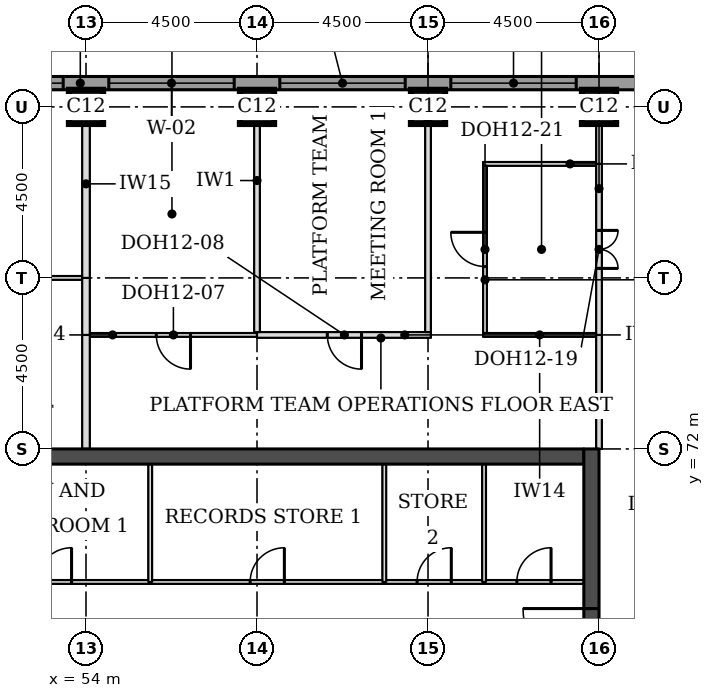
"""IFC4 building model, lengths in metres.
Left out: names, types, materials, properties, quantities, classifications, styles, units other than length and angle.
Written with IfcOpenShell. Run it as: python <this file> out.ifc"""

import sys

from ifc_helpers import new_model, si_unit, direction, frame, frame_2d, origin, origin_2d, place, context, subcontext, project, spatial, rectangle, extrude, element, fill, save


model = new_model("IFC4")
c1 = context("Model", 3, precision=1e-05, world=origin(), true_north=direction((0.0, 1.0)))
c2 = subcontext(c1, "Body", "Model", "MODEL_VIEW")
j1 = project(units=[si_unit("LENGTHUNIT", "METRE"), si_unit("PLANEANGLEUNIT", "RADIAN")], contexts=[c1])
p1 = place(None, origin())
s1 = spatial("IfcSite", under=j1, at=p1, CompositionType="ELEMENT")
p2 = place(p1, origin())
s2 = spatial("IfcBuilding", under=s1, at=p2, CompositionType="ELEMENT")
p3 = place(p2, frame((0.0, 0.0, 245.2)))
s3 = spatial("IfcBuildingStorey", under=s2, at=p3, CompositionType="ELEMENT", Elevation=245.2)
for number, where, z_axis, x_axis in (
    (1, (54.0, 81.0, 0.0), (0.0, 0.0, 1.0), (1.0, 0.0, 0.0)),
    (2, (58.5, 81.0, 0.0), (0.0, 0.0, 1.0), (1.0, 0.0, 0.0)),
    (3, (63.0, 81.0, 0.0), (0.0, 0.0, 1.0), (1.0, 0.0, 0.0)),
    (4, (67.5, 81.0, 0.0), (0.0, 0.0, 1.0), (1.0, 0.0, 0.0)),
):
    element("IfcColumn", number, at=place(p3, frame(where, z_axis=z_axis, x_axis=x_axis)), inside=s3, PredefinedType="COLUMN", context=c2, shape_type="SweptSolid", body=[
        extrude(rectangle(XDim=0.9, YDim=0.9, at=origin_2d()), origin(), (0.0, 0.0, 1.0), 3.7),
    ])
p4 = place(p3, frame((45.4, 71.8, 0.0), z_axis=(0.0, 0.0, 1.0), x_axis=(1.0, 0.0, 0.0)))
e5 = element("IfcWall", 5, at=p4, inside=s3, PredefinedType="SHEAR", context=c2, shape_type="SweptSolid", body=[
    extrude(rectangle(XDim=21.7, YDim=0.4, at=frame_2d((10.85, 0.0))), origin(), (0.0, 0.0, 1.0), 3.7),
])
p5 = place(p3, frame((67.3, 49.5, 0.0), z_axis=(0.0, 0.0, 1.0), x_axis=(0.0, 1.0, 0.0)))
e6 = element("IfcWall", 6, at=p5, inside=s3, PredefinedType="SHEAR", context=c2, shape_type="SweptSolid", body=[
    extrude(rectangle(XDim=22.5, YDim=0.4, at=frame_2d((11.25, 0.0))), origin(), (0.0, 0.0, 1.0), 3.7),
])
p6 = place(p5, frame((4.2, 0.0, 0.0)))
e7 = element("IfcOpeningElement", 7, at=p6, cuts=e6, PredefinedType="OPENING", context=c2, shape_type="SweptSolid", body=[
    extrude(rectangle(XDim=1.8, YDim=2.1, at=frame_2d((0.9, 1.05))), frame((0.0, 0.21, 0.0), z_axis=(0.0, -1.0, 0.0), x_axis=(1.0, 0.0, 0.0)), (0.0, 0.0, 1.0), 0.42),
])
p7 = place(p5, frame((6.9, 0.0, 0.0)))
e8 = element("IfcOpeningElement", 8, at=p7, cuts=e6, PredefinedType="OPENING", context=c2, shape_type="SweptSolid", body=[
    extrude(rectangle(XDim=1.1, YDim=2.1, at=frame_2d((0.55, 1.05))), frame((0.0, 0.21, 0.0), z_axis=(0.0, -1.0, 0.0), x_axis=(1.0, 0.0, 0.0)), (0.0, 0.0, 1.0), 0.42),
])
p8 = place(p5, frame((13.6, 0.0, 0.0)))
e9 = element("IfcOpeningElement", 9, at=p8, cuts=e6, PredefinedType="OPENING", context=c2, shape_type="SweptSolid", body=[
    extrude(rectangle(XDim=1.1, YDim=2.1, at=frame_2d((0.55, 1.05))), frame((0.0, 0.21, 0.0), z_axis=(0.0, -1.0, 0.0), x_axis=(1.0, 0.0, 0.0)), (0.0, 0.0, 1.0), 0.42),
])
p9 = place(p5, frame((16.5, 0.0, 0.0)))
e10 = element("IfcOpeningElement", 10, at=p9, cuts=e6, PredefinedType="OPENING", context=c2, shape_type="SweptSolid", body=[
    extrude(rectangle(XDim=1.8, YDim=2.1, at=frame_2d((0.9, 1.05))), frame((0.0, 0.21, 0.0), z_axis=(0.0, -1.0, 0.0), x_axis=(1.0, 0.0, 0.0)), (0.0, 0.0, 1.0), 0.42),
])
p10 = place(p3, frame((72.331, 81.625, 0.0), z_axis=(0.0, 0.0, 1.0), x_axis=(-1.0, 0.0, 0.0)))
e11 = element("IfcWall", 11, at=p10, inside=s3, PredefinedType="STANDARD", context=c2, shape_type="SweptSolid", body=[
    extrude(rectangle(XDim=32.163, YDim=0.35, at=frame_2d((16.081, 0.0))), origin(), (0.0, 0.0, 1.0), 3.525),
])
p11 = place(p10, frame((5.431, 0.0, 0.9)))
e12 = element("IfcOpeningElement", 12, at=p11, cuts=e11, PredefinedType="OPENING", context=c2, shape_type="SweptSolid", body=[
    extrude(rectangle(XDim=3.3, YDim=1.9, at=frame_2d((1.65, 0.95))), frame((0.0, 0.185, 0.0), z_axis=(0.0, -1.0, 0.0), x_axis=(1.0, 0.0, 0.0)), (0.0, 0.0, 1.0), 0.37),
])
p12 = place(p10, frame((9.931, 0.0, 0.9)))
e13 = element("IfcOpeningElement", 13, at=p12, cuts=e11, PredefinedType="OPENING", context=c2, shape_type="SweptSolid", body=[
    extrude(rectangle(XDim=3.3, YDim=1.9, at=frame_2d((1.65, 0.95))), frame((0.0, 0.185, 0.0), z_axis=(0.0, -1.0, 0.0), x_axis=(1.0, 0.0, 0.0)), (0.0, 0.0, 1.0), 0.37),
])
p13 = place(p10, frame((14.431, 0.0, 0.9)))
e14 = element("IfcOpeningElement", 14, at=p13, cuts=e11, PredefinedType="OPENING", context=c2, shape_type="SweptSolid", body=[
    extrude(rectangle(XDim=3.3, YDim=1.9, at=frame_2d((1.65, 0.95))), frame((0.0, 0.185, 0.0), z_axis=(0.0, -1.0, 0.0), x_axis=(1.0, 0.0, 0.0)), (0.0, 0.0, 1.0), 0.37),
])
p14 = place(p10, frame((18.931, 0.0, 0.9)))
e15 = element("IfcOpeningElement", 15, at=p14, cuts=e11, PredefinedType="OPENING", context=c2, shape_type="SweptSolid", body=[
    extrude(rectangle(XDim=3.3, YDim=1.9, at=frame_2d((1.65, 0.95))), frame((0.0, 0.185, 0.0), z_axis=(0.0, -1.0, 0.0), x_axis=(1.0, 0.0, 0.0)), (0.0, 0.0, 1.0), 0.37),
])
p15 = place(p10, frame((23.431, 0.0, 0.9)))
e16 = element("IfcOpeningElement", 16, at=p15, cuts=e11, PredefinedType="OPENING", context=c2, shape_type="SweptSolid", body=[
    extrude(rectangle(XDim=3.3, YDim=1.9, at=frame_2d((1.65, 0.95))), frame((0.0, 0.185, 0.0), z_axis=(0.0, -1.0, 0.0), x_axis=(1.0, 0.0, 0.0)), (0.0, 0.0, 1.0), 0.37),
])
p16 = place(p3, frame((54.1, 75.0, 0.0), z_axis=(0.0, 0.0, 1.0), x_axis=(1.0, 0.0, 0.0)))
e17 = element("IfcWall", 17, at=p16, inside=s3, PredefinedType="PARTITIONING", context=c2, shape_type="SweptSolid", body=[
    extrude(rectangle(XDim=4.4, YDim=0.1, at=frame_2d((2.2, 0.0))), origin(), (0.0, 0.0, 1.0), 3.55),
])
p17 = place(p16, frame((1.75, 0.0, 0.0)))
e18 = element("IfcOpeningElement", 18, at=p17, cuts=e17, PredefinedType="OPENING", context=c2, shape_type="SweptSolid", body=[
    extrude(rectangle(XDim=0.9, YDim=2.1, at=frame_2d((0.45, 1.05))), frame((0.0, 0.06, 0.0), z_axis=(0.0, -1.0, 0.0), x_axis=(1.0, 0.0, 0.0)), (0.0, 0.0, 1.0), 0.12),
])
p18 = place(p3, frame((58.5, 75.0, 0.0), z_axis=(0.0, 0.0, 1.0), x_axis=(1.0, 0.0, 0.0)))
e19 = element("IfcWall", 19, at=p18, inside=s3, PredefinedType="PARTITIONING", context=c2, shape_type="SweptSolid", body=[
    extrude(rectangle(XDim=4.575, YDim=0.15, at=frame_2d((2.288, 0.0))), origin(), (0.0, 0.0, 1.0), 3.55),
])
p19 = place(p18, frame((1.85, 0.0, 0.0)))
e20 = element("IfcOpeningElement", 20, at=p19, cuts=e19, PredefinedType="OPENING", context=c2, shape_type="SweptSolid", body=[
    extrude(rectangle(XDim=0.9, YDim=2.1, at=frame_2d((0.45, 1.05))), frame((0.0, 0.085, 0.0), z_axis=(0.0, -1.0, 0.0), x_axis=(1.0, 0.0, 0.0)), (0.0, 0.0, 1.0), 0.17),
])
p20 = place(p3, frame((64.45, 75.0, 0.0), z_axis=(0.0, 0.0, 1.0), x_axis=(1.0, 0.0, 0.0)))
e21 = element("IfcWall", 21, at=p20, inside=s3, PredefinedType="PARTITIONING", context=c2, shape_type="SweptSolid", body=[
    extrude(rectangle(XDim=2.975, YDim=0.1, at=frame_2d((1.488, 0.0))), origin(), (0.0, 0.0, 1.0), 3.55),
])
p21 = place(p3, frame((49.45, 76.5, 0.0), z_axis=(0.0, 0.0, 1.0), x_axis=(1.0, 0.0, 0.0)))
e22 = element("IfcWall", 22, at=p21, inside=s3, PredefinedType="PARTITIONING", context=c2, shape_type="SweptSolid", body=[
    extrude(rectangle(XDim=4.45, YDim=0.1, at=frame_2d((2.225, 0.0))), origin(), (0.0, 0.0, 1.0), 3.55),
])
p22 = place(p3, frame((64.45, 79.5, 0.0), z_axis=(0.0, 0.0, 1.0), x_axis=(1.0, 0.0, 0.0)))
e23 = element("IfcWall", 23, at=p22, inside=s3, PredefinedType="PARTITIONING", context=c2, shape_type="SweptSolid", body=[
    extrude(rectangle(XDim=2.975, YDim=0.1, at=frame_2d((1.488, 0.0))), origin(), (0.0, 0.0, 1.0), 3.55),
])
p23 = place(p3, frame((54.0, 72.0, 0.0), z_axis=(0.0, 0.0, 1.0), x_axis=(0.0, 1.0, 0.0)))
e24 = element("IfcWall", 24, at=p23, inside=s3, PredefinedType="PARTITIONING", context=c2, shape_type="SweptSolid", body=[
    extrude(rectangle(XDim=3.0, YDim=0.2, at=frame_2d((1.5, 0.0))), origin(), (0.0, 0.0, 1.0), 3.55),
])
p24 = place(p3, frame((67.5, 72.0, 0.0), z_axis=(0.0, 0.0, 1.0), x_axis=(0.0, 1.0, 0.0)))
e25 = element("IfcWall", 25, at=p24, inside=s3, PredefinedType="PARTITIONING", context=c2, shape_type="SweptSolid", body=[
    extrude(rectangle(XDim=3.0, YDim=0.15, at=frame_2d((1.5, 0.0))), origin(), (0.0, 0.0, 1.0), 3.022),
])
p25 = place(p3, frame((54.0, 75.0, 0.0), z_axis=(0.0, 0.0, 1.0), x_axis=(0.0, 1.0, 0.0)))
e26 = element("IfcWall", 26, at=p25, inside=s3, PredefinedType="PARTITIONING", context=c2, shape_type="SweptSolid", body=[
    extrude(rectangle(XDim=1.5, YDim=0.2, at=frame_2d((0.75, 0.0))), origin(), (0.0, 0.0, 1.0), 3.55),
])
p26 = place(p3, frame((67.5, 75.0, 0.0), z_axis=(0.0, 0.0, 1.0), x_axis=(0.0, 1.0, 0.0)))
e27 = element("IfcWall", 27, at=p26, inside=s3, PredefinedType="PARTITIONING", context=c2, shape_type="SweptSolid", body=[
    extrude(rectangle(XDim=4.5, YDim=0.15, at=frame_2d((2.25, 0.0))), origin(), (0.0, 0.0, 1.0), 3.022),
])
p27 = place(p26, frame((1.75, 0.0, 0.0)))
e28 = element("IfcOpeningElement", 28, at=p27, cuts=e27, PredefinedType="OPENING", context=c2, shape_type="SweptSolid", body=[
    extrude(rectangle(XDim=1.0, YDim=2.1, at=frame_2d((0.5, 1.05))), frame((0.0, 0.085, 0.0), z_axis=(0.0, -1.0, 0.0), x_axis=(1.0, 0.0, 0.0)), (0.0, 0.0, 1.0), 0.17),
])
p28 = place(p3, frame((64.5, 75.05, 0.0), z_axis=(0.0, 0.0, 1.0), x_axis=(0.0, 1.0, 0.0)))
e29 = element("IfcWall", 29, at=p28, inside=s3, PredefinedType="PARTITIONING", context=c2, shape_type="SweptSolid", body=[
    extrude(rectangle(XDim=4.4, YDim=0.1, at=frame_2d((2.2, 0.0))), origin(), (0.0, 0.0, 1.0), 3.55),
])
p29 = place(p28, frame((1.75, 0.0, 0.0)))
e30 = element("IfcOpeningElement", 30, at=p29, cuts=e29, PredefinedType="OPENING", context=c2, shape_type="SweptSolid", body=[
    extrude(rectangle(XDim=0.9, YDim=2.1, at=frame_2d((0.45, 1.05))), frame((0.0, 0.06, 0.0), z_axis=(0.0, -1.0, 0.0), x_axis=(1.0, 0.0, 0.0)), (0.0, 0.0, 1.0), 0.12),
])
for number, where, z_axis, x_axis in (
    (31, (58.5, 75.075, 0.0), (0.0, 0.0, 1.0), (0.0, 1.0, 0.0)),
    (32, (63.0, 75.075, 0.0), (0.0, 0.0, 1.0), (0.0, 1.0, 0.0)),
):
    element("IfcWall", number, at=place(p3, frame(where, z_axis=z_axis, x_axis=x_axis)), inside=s3, PredefinedType="PARTITIONING", context=c2, shape_type="SweptSolid", body=[
        extrude(rectangle(XDim=6.375, YDim=0.15, at=frame_2d((3.188, 0.0))), origin(), (0.0, 0.0, 1.0), 3.55),
    ])
p30 = place(p3, frame((54.0, 76.5, 0.0), z_axis=(0.0, 0.0, 1.0), x_axis=(0.0, 1.0, 0.0)))
e33 = element("IfcWall", 33, at=p30, inside=s3, PredefinedType="PARTITIONING", context=c2, shape_type="SweptSolid", body=[
    extrude(rectangle(XDim=4.95, YDim=0.2, at=frame_2d((2.475, 0.0))), origin(), (0.0, 0.0, 1.0), 3.55),
])
p31 = place(p3, frame((67.5, 79.5, 0.0), z_axis=(0.0, 0.0, 1.0), x_axis=(0.0, 1.0, 0.0)))
e34 = element("IfcWall", 34, at=p31, inside=s3, PredefinedType="PARTITIONING", context=c2, shape_type="SweptSolid", body=[
    extrude(rectangle(XDim=1.95, YDim=0.15, at=frame_2d((0.975, 0.0))), origin(), (0.0, 0.0, 1.0), 3.022),
])
p32 = place(p3, frame((45.4, 68.5, 0.0), z_axis=(0.0, 0.0, 1.0), x_axis=(1.0, 0.0, 0.0)))
e35 = element("IfcWall", 35, at=p32, inside=s3, PredefinedType="PARTITIONING", context=c2, shape_type="SweptSolid", body=[
    extrude(rectangle(XDim=21.7, YDim=0.1, at=frame_2d((10.85, 0.0))), origin(), (0.0, 0.0, 1.0), 3.55),
])
p33 = place(p32, frame((19.938, 0.0, 0.0)))
e36 = element("IfcOpeningElement", 36, at=p33, cuts=e35, PredefinedType="OPENING", context=c2, shape_type="SweptSolid", body=[
    extrude(rectangle(XDim=0.9, YDim=2.1, at=frame_2d((0.45, 1.05))), frame((0.0, 0.06, 0.0), z_axis=(0.0, -1.0, 0.0), x_axis=(1.0, 0.0, 0.0)), (0.0, 0.0, 1.0), 0.12),
])
p34 = place(p32, frame((17.312, 0.0, 0.0)))
e37 = element("IfcOpeningElement", 37, at=p34, cuts=e35, PredefinedType="OPENING", context=c2, shape_type="SweptSolid", body=[
    extrude(rectangle(XDim=0.9, YDim=2.1, at=frame_2d((0.45, 1.05))), frame((0.0, 0.06, 0.0), z_axis=(0.0, -1.0, 0.0), x_axis=(1.0, 0.0, 0.0)), (0.0, 0.0, 1.0), 0.12),
])
p35 = place(p32, frame((0.442, 0.0, 0.0)))
e38 = element("IfcOpeningElement", 38, at=p35, cuts=e35, PredefinedType="OPENING", context=c2, shape_type="SweptSolid", body=[
    extrude(rectangle(XDim=0.9, YDim=2.1, at=frame_2d((0.45, 1.05))), frame((0.0, 0.06, 0.0), z_axis=(0.0, -1.0, 0.0), x_axis=(1.0, 0.0, 0.0)), (0.0, 0.0, 1.0), 0.12),
])
p36 = place(p32, frame((2.201, 0.0, 0.0)))
e39 = element("IfcOpeningElement", 39, at=p36, cuts=e35, PredefinedType="OPENING", context=c2, shape_type="SweptSolid", body=[
    extrude(rectangle(XDim=0.9, YDim=2.1, at=frame_2d((0.45, 1.05))), frame((0.0, 0.06, 0.0), z_axis=(0.0, -1.0, 0.0), x_axis=(1.0, 0.0, 0.0)), (0.0, 0.0, 1.0), 0.12),
])
p37 = place(p32, frame((3.934, 0.0, 0.0)))
e40 = element("IfcOpeningElement", 40, at=p37, cuts=e35, PredefinedType="OPENING", context=c2, shape_type="SweptSolid", body=[
    extrude(rectangle(XDim=0.9, YDim=2.1, at=frame_2d((0.45, 1.05))), frame((0.0, 0.06, 0.0), z_axis=(0.0, -1.0, 0.0), x_axis=(1.0, 0.0, 0.0)), (0.0, 0.0, 1.0), 0.12),
])
p38 = place(p32, frame((12.92, 0.0, 0.0)))
e41 = element("IfcOpeningElement", 41, at=p38, cuts=e35, PredefinedType="OPENING", context=c2, shape_type="SweptSolid", body=[
    extrude(rectangle(XDim=0.9, YDim=2.1, at=frame_2d((0.45, 1.05))), frame((0.0, 0.06, 0.0), z_axis=(0.0, -1.0, 0.0), x_axis=(1.0, 0.0, 0.0)), (0.0, 0.0, 1.0), 0.12),
])
p39 = place(p32, frame((7.32, 0.0, 0.0)))
e42 = element("IfcOpeningElement", 42, at=p39, cuts=e35, PredefinedType="OPENING", context=c2, shape_type="SweptSolid", body=[
    extrude(rectangle(XDim=0.9, YDim=2.1, at=frame_2d((0.45, 1.05))), frame((0.0, 0.06, 0.0), z_axis=(0.0, -1.0, 0.0), x_axis=(1.0, 0.0, 0.0)), (0.0, 0.0, 1.0), 0.12),
])
for number, where, z_axis, x_axis in (
    (43, (55.69, 68.5, 0.0), (0.0, 0.0, 1.0), (0.0, 1.0, 0.0)),
    (44, (61.85, 68.5, 0.0), (0.0, 0.0, 1.0), (0.0, 1.0, 0.0)),
    (45, (64.475, 68.5, 0.0), (0.0, 0.0, 1.0), (0.0, 1.0, 0.0)),
):
    element("IfcWall", number, at=place(p3, frame(where, z_axis=z_axis, x_axis=x_axis)), inside=s3, PredefinedType="PARTITIONING", context=c2, shape_type="SweptSolid", body=[
        extrude(rectangle(XDim=3.1, YDim=0.1, at=frame_2d((1.55, 0.0))), origin(), (0.0, 0.0, 1.0), 3.55),
    ])
p40 = place(p11, origin())
e46 = element("IfcWindow", 46, at=p40, inside=s3, PartitioningType="SINGLE_PANEL", PredefinedType="WINDOW", context=c2, shape_type="SweptSolid", body=[
    extrude(rectangle(XDim=3.3, YDim=1.9, at=frame_2d((1.65, 0.95))), frame((0.0, 0.085, 0.0), z_axis=(0.0, -1.0, 0.0), x_axis=(1.0, 0.0, 0.0)), (0.0, 0.0, 1.0), 0.06),
])
fill(e12, e46)
p41 = place(p12, origin())
e47 = element("IfcWindow", 47, at=p41, inside=s3, PartitioningType="SINGLE_PANEL", PredefinedType="WINDOW", context=c2, shape_type="SweptSolid", body=[
    extrude(rectangle(XDim=3.3, YDim=1.9, at=frame_2d((1.65, 0.95))), frame((0.0, 0.085, 0.0), z_axis=(0.0, -1.0, 0.0), x_axis=(1.0, 0.0, 0.0)), (0.0, 0.0, 1.0), 0.06),
])
fill(e13, e47)
p42 = place(p13, origin())
e48 = element("IfcWindow", 48, at=p42, inside=s3, PartitioningType="SINGLE_PANEL", PredefinedType="WINDOW", context=c2, shape_type="SweptSolid", body=[
    extrude(rectangle(XDim=3.3, YDim=1.9, at=frame_2d((1.65, 0.95))), frame((0.0, 0.085, 0.0), z_axis=(0.0, -1.0, 0.0), x_axis=(1.0, 0.0, 0.0)), (0.0, 0.0, 1.0), 0.06),
])
fill(e14, e48)
p43 = place(p14, origin())
e49 = element("IfcWindow", 49, at=p43, inside=s3, PartitioningType="SINGLE_PANEL", PredefinedType="WINDOW", context=c2, shape_type="SweptSolid", body=[
    extrude(rectangle(XDim=3.3, YDim=1.9, at=frame_2d((1.65, 0.95))), frame((0.0, 0.085, 0.0), z_axis=(0.0, -1.0, 0.0), x_axis=(1.0, 0.0, 0.0)), (0.0, 0.0, 1.0), 0.06),
])
fill(e15, e49)
p44 = place(p27, frame((1.0, 0.0, 0.0), z_axis=(0.0, 0.0, 1.0), x_axis=(-1.0, 0.0, 0.0)))
e50 = element("IfcDoor", 50, at=p44, inside=s3, OperationType="DOUBLE_DOOR_SINGLE_SWING", PredefinedType="DOOR", context=c2, shape_type="SweptSolid", body=[
    extrude(rectangle(XDim=1.0, YDim=2.1, at=frame_2d((0.5, 1.05))), frame((0.0, 0.025, 0.0), z_axis=(0.0, -1.0, 0.0), x_axis=(1.0, 0.0, 0.0)), (0.0, 0.0, 1.0), 0.05),
])
fill(e28, e50)
p45 = place(p29, origin())
e51 = element("IfcDoor", 51, at=p45, inside=s3, OperationType="SINGLE_SWING_RIGHT", PredefinedType="DOOR", context=c2, shape_type="SweptSolid", body=[
    extrude(rectangle(XDim=0.9, YDim=2.1, at=frame_2d((0.45, 1.05))), frame((0.0, 0.025, 0.0), z_axis=(0.0, -1.0, 0.0), x_axis=(1.0, 0.0, 0.0)), (0.0, 0.0, 1.0), 0.05),
])
fill(e30, e51)
p46 = place(p17, frame((0.9, 0.0, 0.0), z_axis=(0.0, 0.0, 1.0), x_axis=(-1.0, 0.0, 0.0)))
e52 = element("IfcDoor", 52, at=p46, inside=s3, OperationType="SINGLE_SWING_LEFT", PredefinedType="DOOR", context=c2, shape_type="SweptSolid", body=[
    extrude(rectangle(XDim=0.9, YDim=2.1, at=frame_2d((0.45, 1.05))), frame((0.0, 0.025, 0.0), z_axis=(0.0, -1.0, 0.0), x_axis=(1.0, 0.0, 0.0)), (0.0, 0.0, 1.0), 0.05),
])
fill(e18, e52)
p47 = place(p19, frame((0.9, 0.0, 0.0), z_axis=(0.0, 0.0, 1.0), x_axis=(-1.0, 0.0, 0.0)))
e53 = element("IfcDoor", 53, at=p47, inside=s3, OperationType="SINGLE_SWING_LEFT", PredefinedType="DOOR", context=c2, shape_type="SweptSolid", body=[
    extrude(rectangle(XDim=0.9, YDim=2.1, at=frame_2d((0.45, 1.05))), frame((0.0, 0.025, 0.0), z_axis=(0.0, -1.0, 0.0), x_axis=(1.0, 0.0, 0.0)), (0.0, 0.0, 1.0), 0.05),
])
fill(e20, e53)
p48 = place(p9, origin())
e54 = element("IfcDoor", 54, at=p48, inside=s3, OperationType="SINGLE_SWING_RIGHT", PredefinedType="DOOR", context=c2, shape_type="SweptSolid", body=[
    extrude(rectangle(XDim=1.8, YDim=2.1, at=frame_2d((0.9, 1.05))), frame((0.0, 0.025, 0.0), z_axis=(0.0, -1.0, 0.0), x_axis=(1.0, 0.0, 0.0)), (0.0, 0.0, 1.0), 0.05),
])
fill(e10, e54)
p49 = place(p33, origin())
e55 = element("IfcDoor", 55, at=p49, inside=s3, OperationType="SINGLE_SWING_RIGHT", PredefinedType="DOOR", context=c2, shape_type="SweptSolid", body=[
    extrude(rectangle(XDim=0.9, YDim=2.1, at=frame_2d((0.45, 1.05))), frame((0.0, 0.025, 0.0), z_axis=(0.0, -1.0, 0.0), x_axis=(1.0, 0.0, 0.0)), (0.0, 0.0, 1.0), 0.05),
])
fill(e36, e55)
p50 = place(p34, origin())
e56 = element("IfcDoor", 56, at=p50, inside=s3, OperationType="SINGLE_SWING_RIGHT", PredefinedType="DOOR", context=c2, shape_type="SweptSolid", body=[
    extrude(rectangle(XDim=0.9, YDim=2.1, at=frame_2d((0.45, 1.05))), frame((0.0, 0.025, 0.0), z_axis=(0.0, -1.0, 0.0), x_axis=(1.0, 0.0, 0.0)), (0.0, 0.0, 1.0), 0.05),
])
fill(e37, e56)
p51 = place(p38, origin())
e57 = element("IfcDoor", 57, at=p51, inside=s3, OperationType="SINGLE_SWING_RIGHT", PredefinedType="DOOR", context=c2, shape_type="SweptSolid", body=[
    extrude(rectangle(XDim=0.9, YDim=2.1, at=frame_2d((0.45, 1.05))), frame((0.0, 0.025, 0.0), z_axis=(0.0, -1.0, 0.0), x_axis=(1.0, 0.0, 0.0)), (0.0, 0.0, 1.0), 0.05),
])
fill(e41, e57)
p52 = place(p39, origin())
e58 = element("IfcDoor", 58, at=p52, inside=s3, OperationType="SINGLE_SWING_RIGHT", PredefinedType="DOOR", context=c2, shape_type="SweptSolid", body=[
    extrude(rectangle(XDim=0.9, YDim=2.1, at=frame_2d((0.45, 1.05))), frame((0.0, 0.025, 0.0), z_axis=(0.0, -1.0, 0.0), x_axis=(1.0, 0.0, 0.0)), (0.0, 0.0, 1.0), 0.05),
])
fill(e42, e58)
save(model, sys.argv[1])
